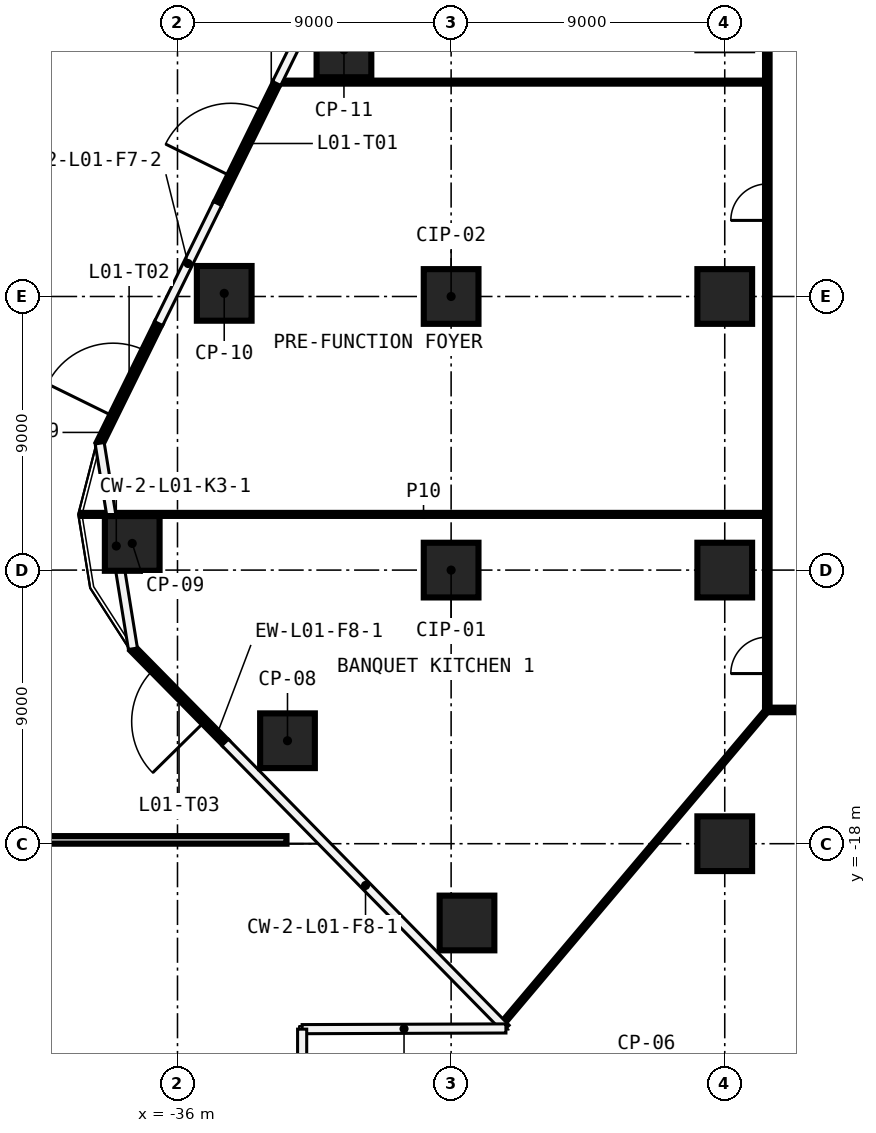
"""IFC4 building model, lengths in metres.
Left out: names, types, materials, properties, quantities, classifications, styles, units other than length and angle.
Written with IfcOpenShell. Run it as: python <this file> out.ifc"""

import sys

from ifc_helpers import new_model, si_unit, direction, frame, frame_2d, origin, origin_2d, place, context, subcontext, project, spatial, rectangle, extrude, element, fill, save


model = new_model("IFC4")
c1 = context("Model", 3, precision=1e-05, world=origin(), true_north=direction((0.0, 1.0)))
c2 = subcontext(c1, "Body", "Model", "MODEL_VIEW")
j1 = project(units=[si_unit("LENGTHUNIT", "METRE"), si_unit("PLANEANGLEUNIT", "RADIAN")], contexts=[c1])
p1 = place(None, origin())
s1 = spatial("IfcSite", under=j1, at=p1, CompositionType="ELEMENT")
p2 = place(p1, origin())
s2 = spatial("IfcBuilding", under=s1, at=p2, CompositionType="ELEMENT")
p3 = place(p2, frame((0.0, 0.0, 9.0)))
s3 = spatial("IfcBuildingStorey", under=s2, at=p3, CompositionType="ELEMENT", Elevation=9.0)
for number, where, z_axis, x_axis in (
    (1, (-26.478, -20.608, 0.0), (0.0, 0.0, 1.0), (1.0, 0.0, 0.0)),
    (2, (-32.382, -14.613, 0.0), (0.0, 0.0, 1.0), (1.0, 0.0, 0.0)),
    (3, (-37.489, -8.123, 0.0), (0.0, 0.0, 1.0), (1.0, 0.0, 0.0)),
    (4, (-34.463, 0.103, 0.0), (0.0, 0.0, 1.0), (1.0, 0.0, 0.0)),
    (5, (-30.525, 8.111, 0.0), (0.0, 0.0, 1.0), (1.0, 0.0, 0.0)),
    (6, (-27.0, -9.0, 0.0), (0.0, 0.0, 1.0), (1.0, 0.0, 0.0)),
    (7, (-27.0, 0.0, 0.0), (0.0, 0.0, 1.0), (1.0, 0.0, 0.0)),
    (8, (-18.0, -18.0, 0.0), (0.0, 0.0, 1.0), (1.0, 0.0, 0.0)),
    (9, (-18.0, -9.0, 0.0), (0.0, 0.0, 1.0), (1.0, 0.0, 0.0)),
    (10, (-18.0, 0.0, 0.0), (0.0, 0.0, 1.0), (1.0, 0.0, 0.0)),
):
    element("IfcColumn", number, at=place(p3, frame(where, z_axis=z_axis, x_axis=x_axis)), inside=s3, PredefinedType="COLUMN", context=c2, shape_type="SweptSolid", body=[
        extrude(rectangle(XDim=1.8, YDim=1.8, at=origin_2d()), origin(), (0.0, 0.0, 1.0), 9.55),
    ])
p4 = place(p3, frame((16.675, -13.6, 0.0), z_axis=(0.0, 0.0, 1.0), x_axis=(-1.0, 0.0, 0.0)))
e11 = element("IfcWall", 11, at=p4, inside=s3, PredefinedType="PARTITIONING", context=c2, shape_type="SweptSolid", body=[
    extrude(rectangle(XDim=33.35, YDim=0.15, at=frame_2d((16.675, 0.0))), origin(), (0.0, 0.0, 1.0), 9.55),
])
p5 = place(p4, frame((25.853, 0.0, 0.0)))
e12 = element("IfcOpeningElement", 12, at=p5, cuts=e11, PredefinedType="OPENING", context=c2, shape_type="SweptSolid", body=[
    extrude(rectangle(XDim=1.2, YDim=2.1, at=frame_2d((0.6, 1.05))), frame((0.0, 0.085, 0.0), z_axis=(0.0, -1.0, 0.0), x_axis=(1.0, 0.0, 0.0)), (0.0, 0.0, 1.0), 0.17),
])
p6 = place(p4, frame((14.742, 0.0, 0.0)))
e13 = element("IfcOpeningElement", 13, at=p6, cuts=e11, PredefinedType="OPENING", context=c2, shape_type="SweptSolid", body=[
    extrude(rectangle(XDim=1.2, YDim=2.1, at=frame_2d((0.6, 1.05))), frame((0.0, 0.085, 0.0), z_axis=(0.0, -1.0, 0.0), x_axis=(1.0, 0.0, 0.0)), (0.0, 0.0, 1.0), 0.17),
])
p7 = place(p4, frame((1.764, 0.0, 0.0)))
e14 = element("IfcOpeningElement", 14, at=p7, cuts=e11, PredefinedType="OPENING", context=c2, shape_type="SweptSolid", body=[
    extrude(rectangle(XDim=1.2, YDim=2.1, at=frame_2d((0.6, 1.05))), frame((0.0, 0.085, 0.0), z_axis=(0.0, -1.0, 0.0), x_axis=(1.0, 0.0, 0.0)), (0.0, 0.0, 1.0), 0.17),
])
p8 = place(p3, frame((-39.14, -7.168, 0.0), z_axis=(0.0, 0.0, 1.0), x_axis=(1.0, 0.0, 0.0)))
e15 = element("IfcWall", 15, at=p8, inside=s3, PredefinedType="PARTITIONING", context=c2, shape_type="SweptSolid", body=[
    extrude(rectangle(XDim=22.465, YDim=0.1, at=frame_2d((11.232, 0.0))), origin(), (0.0, 0.0, 1.0), 9.55),
])
p9 = place(p3, frame((-32.695, 7.051, 0.0), z_axis=(0.0, 0.0, 1.0), x_axis=(1.0, 0.0, 0.0)))
e16 = element("IfcWall", 16, at=p9, inside=s3, PredefinedType="PARTITIONING", context=c2, shape_type="SweptSolid", body=[
    extrude(rectangle(XDim=16.02, YDim=0.1, at=frame_2d((8.01, 0.0))), origin(), (0.0, 0.0, 1.0), 9.55),
])
p10 = place(p3, frame((-25.304, -23.908, 0.0), z_axis=(0.0, 0.0, 1.0), x_axis=(0.645188329464, 0.764023572623, 0.0)))
e17 = element("IfcWall", 17, at=p10, inside=s3, PredefinedType="PARTITIONING", context=c2, shape_type="SweptSolid", body=[
    extrude(rectangle(XDim=13.491, YDim=0.1, at=frame_2d((6.746, 0.0))), origin(), (0.0, 0.0, 1.0), 9.55),
])
p11 = place(p3, frame((-16.6, -13.525, 0.0), z_axis=(0.0, 0.0, 1.0), x_axis=(0.0, 1.0, 0.0)))
e18 = element("IfcWall", 18, at=p11, inside=s3, PredefinedType="PARTITIONING", context=c2, shape_type="SweptSolid", body=[
    extrude(rectangle(XDim=27.05, YDim=0.15, at=frame_2d((13.525, 0.0))), origin(), (0.0, 0.0, 1.0), 9.55),
])
p12 = place(p11, frame((16.028, 0.0, 0.0)))
e19 = element("IfcOpeningElement", 19, at=p12, cuts=e18, PredefinedType="OPENING", context=c2, shape_type="SweptSolid", body=[
    extrude(rectangle(XDim=1.2, YDim=2.1, at=frame_2d((0.6, 1.05))), frame((0.0, 0.085, 0.0), z_axis=(0.0, -1.0, 0.0), x_axis=(1.0, 0.0, 0.0)), (0.0, 0.0, 1.0), 0.17),
])
p13 = place(p11, frame((1.121, 0.0, 0.0)))
e20 = element("IfcOpeningElement", 20, at=p13, cuts=e18, PredefinedType="OPENING", context=c2, shape_type="SweptSolid", body=[
    extrude(rectangle(XDim=1.2, YDim=2.1, at=frame_2d((0.6, 1.05))), frame((0.0, 0.085, 0.0), z_axis=(0.0, -1.0, 0.0), x_axis=(1.0, 0.0, 0.0)), (0.0, 0.0, 1.0), 0.17),
])
p14 = place(p11, frame((24.705, 0.0, 0.0)))
e21 = element("IfcOpeningElement", 21, at=p14, cuts=e18, PredefinedType="OPENING", context=c2, shape_type="SweptSolid", body=[
    extrude(rectangle(XDim=1.2, YDim=2.1, at=frame_2d((0.6, 1.05))), frame((0.0, 0.085, 0.0), z_axis=(0.0, -1.0, 0.0), x_axis=(1.0, 0.0, 0.0)), (0.0, 0.0, 1.0), 0.17),
])
p15 = place(p3, frame((-34.681, 3.059, 0.0), z_axis=(0.0, 0.0, 1.0), x_axis=(0.441343829608, 0.897338076796, 0.0)))
e22 = element("IfcWall", 22, at=p15, inside=s3, PredefinedType="SOLIDWALL", context=c2, shape_type="SweptSolid", body=[
    extrude(rectangle(XDim=4.399, YDim=0.2, at=frame_2d((2.2, 0.0))), origin(), (0.0, 0.0, 1.0), 9.55),
])
p16 = place(p15, frame((1.0, 0.0, 0.0)))
e23 = element("IfcOpeningElement", 23, at=p16, cuts=e22, PredefinedType="OPENING", context=c2, shape_type="SweptSolid", body=[
    extrude(rectangle(XDim=2.4, YDim=2.4, at=frame_2d((1.2, 1.2))), frame((0.0, 0.11, 0.0), z_axis=(0.0, -1.0, 0.0), x_axis=(1.0, 0.0, 0.0)), (0.0, 0.0, 1.0), 0.22),
])
p17 = place(p3, frame((-38.56, -4.828, 0.0), z_axis=(0.0, 0.0, 1.0), x_axis=(0.44132993544, 0.897344910324, 0.0)))
e24 = element("IfcWall", 24, at=p17, inside=s3, PredefinedType="SOLIDWALL", context=c2, shape_type="SweptSolid", body=[
    extrude(rectangle(XDim=4.389, YDim=0.2, at=frame_2d((2.194, 0.0))), origin(), (0.0, 0.0, 1.0), 9.55),
])
p18 = place(p17, frame((0.995, 0.0, 0.0)))
e25 = element("IfcOpeningElement", 25, at=p18, cuts=e24, PredefinedType="OPENING", context=c2, shape_type="SweptSolid", body=[
    extrude(rectangle(XDim=2.4, YDim=2.4, at=frame_2d((1.2, 1.2))), frame((0.0, 0.11, 0.0), z_axis=(0.0, -1.0, 0.0), x_axis=(1.0, 0.0, 0.0)), (0.0, 0.0, 1.0), 0.22),
])
p19 = place(p3, frame((-34.433, -14.668, 0.0), z_axis=(0.0, 0.0, 1.0), x_axis=(-0.701721153611, 0.712451698415, 0.0)))
e26 = element("IfcWall", 26, at=p19, inside=s3, PredefinedType="SOLIDWALL", context=c2, shape_type="SweptSolid", body=[
    extrude(rectangle(XDim=4.323, YDim=0.2, at=frame_2d((2.161, 0.0))), origin(), (0.0, 0.0, 1.0), 9.55),
])
p20 = place(p19, frame((0.961, 0.0, 0.0)))
e27 = element("IfcOpeningElement", 27, at=p20, cuts=e26, PredefinedType="OPENING", context=c2, shape_type="SweptSolid", body=[
    extrude(rectangle(XDim=2.4, YDim=2.4, at=frame_2d((1.2, 1.2))), frame((0.0, 0.11, 0.0), z_axis=(0.0, -1.0, 0.0), x_axis=(1.0, 0.0, 0.0)), (0.0, 0.0, 1.0), 0.22),
])
p21 = place(p3, frame((-32.415, -17.875, 0.0), z_axis=(0.0, 0.0, 1.0), x_axis=(-1.0, 0.0, 0.0)))
e28 = element("IfcWall", 28, at=p21, inside=s3, PredefinedType="PARAPET", context=c2, shape_type="SweptSolid", body=[
    extrude(rectangle(XDim=25.585, YDim=0.25, at=frame_2d((12.793, 0.0))), origin(), (0.0, 0.0, 1.0), 1.2),
])
p22 = place(p12, origin())
e29 = element("IfcDoor", 29, at=p22, inside=s3, OperationType="SINGLE_SWING_RIGHT", PredefinedType="DOOR", context=c2, shape_type="SweptSolid", body=[
    extrude(rectangle(XDim=1.2, YDim=2.1, at=frame_2d((0.6, 1.05))), frame((0.0, 0.025, 0.0), z_axis=(0.0, -1.0, 0.0), x_axis=(1.0, 0.0, 0.0)), (0.0, 0.0, 1.0), 0.05),
])
fill(e19, e29)
p23 = place(p13, origin())
e30 = element("IfcDoor", 30, at=p23, inside=s3, OperationType="SINGLE_SWING_LEFT", PredefinedType="DOOR", context=c2, shape_type="SweptSolid", body=[
    extrude(rectangle(XDim=1.2, YDim=2.1, at=frame_2d((0.6, 1.05))), frame((0.0, 0.025, 0.0), z_axis=(0.0, -1.0, 0.0), x_axis=(1.0, 0.0, 0.0)), (0.0, 0.0, 1.0), 0.05),
])
fill(e20, e30)
p24 = place(p16, origin())
e31 = element("IfcDoor", 31, at=p24, inside=s3, OperationType="SINGLE_SWING_LEFT", PredefinedType="DOOR", context=c2, shape_type="SweptSolid", body=[
    extrude(rectangle(XDim=2.4, YDim=2.4, at=frame_2d((1.2, 1.2))), frame((0.0, 0.025, 0.0), z_axis=(0.0, -1.0, 0.0), x_axis=(1.0, 0.0, 0.0)), (0.0, 0.0, 1.0), 0.05),
])
fill(e23, e31)
p25 = place(p18, origin())
e32 = element("IfcDoor", 32, at=p25, inside=s3, OperationType="SINGLE_SWING_LEFT", PredefinedType="DOOR", context=c2, shape_type="SweptSolid", body=[
    extrude(rectangle(XDim=2.4, YDim=2.4, at=frame_2d((1.2, 1.2))), frame((0.0, 0.025, 0.0), z_axis=(0.0, -1.0, 0.0), x_axis=(1.0, 0.0, 0.0)), (0.0, 0.0, 1.0), 0.05),
])
fill(e25, e32)
p26 = place(p20, origin())
e33 = element("IfcDoor", 33, at=p26, inside=s3, OperationType="SINGLE_SWING_LEFT", PredefinedType="DOOR", context=c2, shape_type="SweptSolid", body=[
    extrude(rectangle(XDim=2.4, YDim=2.4, at=frame_2d((1.2, 1.2))), frame((0.0, 0.025, 0.0), z_axis=(0.0, -1.0, 0.0), x_axis=(1.0, 0.0, 0.0)), (0.0, 0.0, 1.0), 0.05),
])
fill(e27, e33)
save(model, sys.argv[1])
